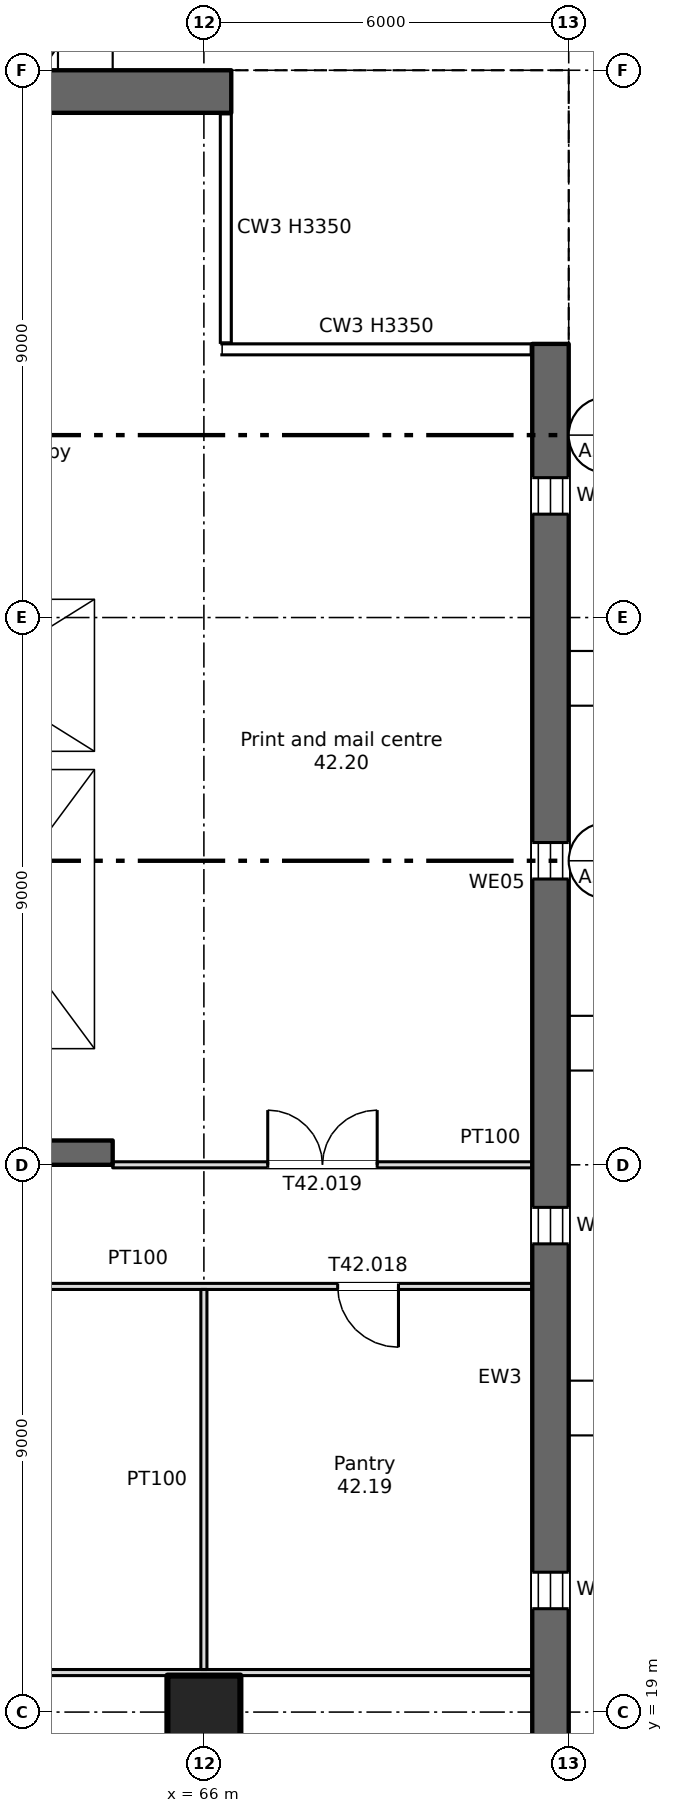
"""IFC4 building model, lengths in metres.
Left out: names, types, materials, properties, quantities, classifications, styles, units other than length and angle.
Written with IfcOpenShell. Run it as: python <this file> out.ifc"""

import sys

from ifc_helpers import new_model, si_unit, direction, frame, frame_2d, origin, origin_2d, place, context, subcontext, project, spatial, rectangle, extrude, element, fill, save


model = new_model("IFC4")
c1 = context("Model", 3, precision=1e-05, world=origin(), true_north=direction((0.0, 1.0)))
c2 = subcontext(c1, "Body", "Model", "MODEL_VIEW")
j1 = project(units=[si_unit("LENGTHUNIT", "METRE"), si_unit("PLANEANGLEUNIT", "RADIAN")], contexts=[c1])
p1 = place(None, origin())
s1 = spatial("IfcSite", under=j1, at=p1, CompositionType="ELEMENT")
p2 = place(p1, origin())
s2 = spatial("IfcBuilding", under=s1, at=p2, CompositionType="ELEMENT")
p3 = place(p2, frame((0.0, 0.0, 166.75)))
s3 = spatial("IfcBuildingStorey", under=s2, at=p3, CompositionType="ELEMENT", Elevation=166.75)
p4 = place(p3, frame((66.0, 19.0, 0.0), z_axis=(0.0, 0.0, 1.0), x_axis=(1.0, 0.0, 0.0)))
e1 = element("IfcColumn", 1, at=p4, inside=s3, PredefinedType="COLUMN", context=c2, shape_type="SweptSolid", body=[
    extrude(rectangle(XDim=1.2, YDim=1.2, at=origin_2d()), origin(), (0.0, 0.0, 1.0), 3.35),
])
p5 = place(p3, frame((71.7, 7.5, 0.0), z_axis=(0.0, 0.0, 1.0), x_axis=(0.0, 1.0, 0.0)))
e2 = element("IfcWall", 2, at=p5, inside=s3, PredefinedType="SHEAR", context=c2, shape_type="SweptSolid", body=[
    extrude(rectangle(XDim=34.0, YDim=0.6, at=frame_2d((17.0, 0.0))), origin(), (0.0, 0.0, 1.0), 3.35),
])
p6 = place(p5, frame((1.2, 0.0, 0.6)))
e3 = element("IfcOpeningElement", 3, at=p6, cuts=e2, PredefinedType="OPENING", context=c2, shape_type="SweptSolid", body=[
    extrude(rectangle(XDim=0.6, YDim=2.4, at=frame_2d((0.3, 1.2))), frame((0.0, 0.31, 0.0), z_axis=(0.0, -1.0, 0.0), x_axis=(1.0, 0.0, 0.0)), (0.0, 0.0, 1.0), 0.62),
])
p7 = place(p5, frame((7.2, 0.0, 0.6)))
e4 = element("IfcOpeningElement", 4, at=p7, cuts=e2, PredefinedType="OPENING", context=c2, shape_type="SweptSolid", body=[
    extrude(rectangle(XDim=0.6, YDim=2.4, at=frame_2d((0.3, 1.2))), frame((0.0, 0.31, 0.0), z_axis=(0.0, -1.0, 0.0), x_axis=(1.0, 0.0, 0.0)), (0.0, 0.0, 1.0), 0.62),
])
p8 = place(p5, frame((13.2, 0.0, 0.6)))
e5 = element("IfcOpeningElement", 5, at=p8, cuts=e2, PredefinedType="OPENING", context=c2, shape_type="SweptSolid", body=[
    extrude(rectangle(XDim=0.6, YDim=2.4, at=frame_2d((0.3, 1.2))), frame((0.0, 0.31, 0.0), z_axis=(0.0, -1.0, 0.0), x_axis=(1.0, 0.0, 0.0)), (0.0, 0.0, 1.0), 0.62),
])
p9 = place(p5, frame((19.2, 0.0, 0.6)))
e6 = element("IfcOpeningElement", 6, at=p9, cuts=e2, PredefinedType="OPENING", context=c2, shape_type="SweptSolid", body=[
    extrude(rectangle(XDim=0.6, YDim=2.4, at=frame_2d((0.3, 1.2))), frame((0.0, 0.31, 0.0), z_axis=(0.0, -1.0, 0.0), x_axis=(1.0, 0.0, 0.0)), (0.0, 0.0, 1.0), 0.62),
])
p10 = place(p5, frame((25.2, 0.0, 0.6)))
e7 = element("IfcOpeningElement", 7, at=p10, cuts=e2, PredefinedType="OPENING", context=c2, shape_type="SweptSolid", body=[
    extrude(rectangle(XDim=0.6, YDim=2.4, at=frame_2d((0.3, 1.2))), frame((0.0, 0.31, 0.0), z_axis=(0.0, -1.0, 0.0), x_axis=(1.0, 0.0, 0.0)), (0.0, 0.0, 1.0), 0.62),
])
p11 = place(p5, frame((31.2, 0.0, 0.6)))
e8 = element("IfcOpeningElement", 8, at=p11, cuts=e2, PredefinedType="OPENING", context=c2, shape_type="SweptSolid", body=[
    extrude(rectangle(XDim=0.6, YDim=2.4, at=frame_2d((0.3, 1.2))), frame((0.0, 0.31, 0.0), z_axis=(0.0, -1.0, 0.0), x_axis=(1.0, 0.0, 0.0)), (0.0, 0.0, 1.0), 0.62),
])
p12 = place(p3, frame((11.55, 45.65, 0.0), z_axis=(0.0, 0.0, 1.0), x_axis=(1.0, 0.0, 0.0)))
e9 = element("IfcWall", 9, at=p12, inside=s3, PredefinedType="SHEAR", context=c2, shape_type="SweptSolid", body=[
    extrude(rectangle(XDim=54.9, YDim=0.7, at=frame_2d((27.45, 0.0))), origin(), (0.0, 0.0, 1.0), 3.35),
])
p13 = place(p3, frame((6.6, 28.2, 0.0), z_axis=(0.0, 0.0, 1.0), x_axis=(1.0, 0.0, 0.0)))
e10 = element("IfcWall", 10, at=p13, inside=s3, PredefinedType="SHEAR", context=c2, shape_type="SweptSolid", body=[
    extrude(rectangle(XDim=57.9, YDim=0.4, at=frame_2d((28.95, 0.0))), origin(), (0.0, 0.0, 1.0), 3.35),
])
p14 = place(p13, frame((12.663, 0.0, 0.0)))
e11 = element("IfcOpeningElement", 11, at=p14, cuts=e10, PredefinedType="OPENING", context=c2, shape_type="SweptSolid", body=[
    extrude(rectangle(XDim=0.9, YDim=2.1, at=frame_2d((0.45, 1.05))), frame((0.0, 0.21, 0.0), z_axis=(0.0, -1.0, 0.0), x_axis=(1.0, 0.0, 0.0)), (0.0, 0.0, 1.0), 0.42),
])
p15 = place(p13, frame((15.238, 0.0, 0.0)))
e12 = element("IfcOpeningElement", 12, at=p15, cuts=e10, PredefinedType="OPENING", context=c2, shape_type="SweptSolid", body=[
    extrude(rectangle(XDim=0.9, YDim=2.1, at=frame_2d((0.45, 1.05))), frame((0.0, 0.21, 0.0), z_axis=(0.0, -1.0, 0.0), x_axis=(1.0, 0.0, 0.0)), (0.0, 0.0, 1.0), 0.42),
])
p16 = place(p13, frame((49.95, 0.0, 0.0)))
e13 = element("IfcOpeningElement", 13, at=p16, cuts=e10, PredefinedType="OPENING", context=c2, shape_type="SweptSolid", body=[
    extrude(rectangle(XDim=0.9, YDim=2.1, at=frame_2d((0.45, 1.05))), frame((0.0, 0.21, 0.0), z_axis=(0.0, -1.0, 0.0), x_axis=(1.0, 0.0, 0.0)), (0.0, 0.0, 1.0), 0.42),
])
p17 = place(p13, frame((0.663, 0.0, 0.0)))
e14 = element("IfcOpeningElement", 14, at=p17, cuts=e10, PredefinedType="OPENING", context=c2, shape_type="SweptSolid", body=[
    extrude(rectangle(XDim=0.9, YDim=2.1, at=frame_2d((0.45, 1.05))), frame((0.0, 0.21, 0.0), z_axis=(0.0, -1.0, 0.0), x_axis=(1.0, 0.0, 0.0)), (0.0, 0.0, 1.0), 0.42),
])
p18 = place(p13, frame((2.238, 0.0, 0.0)))
e15 = element("IfcOpeningElement", 15, at=p18, cuts=e10, PredefinedType="OPENING", context=c2, shape_type="SweptSolid", body=[
    extrude(rectangle(XDim=0.9, YDim=2.1, at=frame_2d((0.45, 1.05))), frame((0.0, 0.21, 0.0), z_axis=(0.0, -1.0, 0.0), x_axis=(1.0, 0.0, 0.0)), (0.0, 0.0, 1.0), 0.42),
])
p19 = place(p13, frame((4.8, 0.0, 0.0)))
e16 = element("IfcOpeningElement", 16, at=p19, cuts=e10, PredefinedType="OPENING", context=c2, shape_type="SweptSolid", body=[
    extrude(rectangle(XDim=1.2, YDim=2.1, at=frame_2d((0.6, 1.05))), frame((0.0, 0.21, 0.0), z_axis=(0.0, -1.0, 0.0), x_axis=(1.0, 0.0, 0.0)), (0.0, 0.0, 1.0), 0.42),
])
p20 = place(p13, frame((31.8, 0.0, 0.0)))
e17 = element("IfcOpeningElement", 17, at=p20, cuts=e10, PredefinedType="OPENING", context=c2, shape_type="SweptSolid", body=[
    extrude(rectangle(XDim=1.2, YDim=2.1, at=frame_2d((0.6, 1.05))), frame((0.0, 0.21, 0.0), z_axis=(0.0, -1.0, 0.0), x_axis=(1.0, 0.0, 0.0)), (0.0, 0.0, 1.0), 0.42),
])
p21 = place(p13, frame((55.3, 0.0, 0.0)))
e18 = element("IfcOpeningElement", 18, at=p21, cuts=e10, PredefinedType="OPENING", context=c2, shape_type="SweptSolid", body=[
    extrude(rectangle(XDim=1.2, YDim=2.1, at=frame_2d((0.6, 1.05))), frame((0.0, 0.21, 0.0), z_axis=(0.0, -1.0, 0.0), x_axis=(1.0, 0.0, 0.0)), (0.0, 0.0, 1.0), 0.42),
])
p22 = place(p13, frame((21.8, 0.0, 0.0)))
e19 = element("IfcOpeningElement", 19, at=p22, cuts=e10, PredefinedType="OPENING", context=c2, shape_type="SweptSolid", body=[
    extrude(rectangle(XDim=1.2, YDim=2.1, at=frame_2d((0.6, 1.05))), frame((0.0, 0.21, 0.0), z_axis=(0.0, -1.0, 0.0), x_axis=(1.0, 0.0, 0.0)), (0.0, 0.0, 1.0), 0.42),
])
p23 = place(p13, frame((41.8, 0.0, 0.0)))
e20 = element("IfcOpeningElement", 20, at=p23, cuts=e10, PredefinedType="OPENING", context=c2, shape_type="SweptSolid", body=[
    extrude(rectangle(XDim=1.2, YDim=2.1, at=frame_2d((0.6, 1.05))), frame((0.0, 0.21, 0.0), z_axis=(0.0, -1.0, 0.0), x_axis=(1.0, 0.0, 0.0)), (0.0, 0.0, 1.0), 0.42),
])
p24 = place(p13, frame((24.95, 0.0, 0.0)))
e21 = element("IfcOpeningElement", 21, at=p24, cuts=e10, PredefinedType="OPENING", context=c2, shape_type="SweptSolid", body=[
    extrude(rectangle(XDim=2.4, YDim=2.1, at=frame_2d((1.2, 1.05))), frame((0.0, 0.21, 0.0), z_axis=(0.0, -1.0, 0.0), x_axis=(1.0, 0.0, 0.0)), (0.0, 0.0, 1.0), 0.42),
])
p25 = place(p13, frame((37.45, 0.0, 0.0)))
e22 = element("IfcOpeningElement", 22, at=p25, cuts=e10, PredefinedType="OPENING", context=c2, shape_type="SweptSolid", body=[
    extrude(rectangle(XDim=2.4, YDim=2.1, at=frame_2d((1.2, 1.05))), frame((0.0, 0.21, 0.0), z_axis=(0.0, -1.0, 0.0), x_axis=(1.0, 0.0, 0.0)), (0.0, 0.0, 1.0), 0.42),
])
p26 = place(p13, frame((8.1, 0.0, 0.0)))
e23 = element("IfcOpeningElement", 23, at=p26, cuts=e10, PredefinedType="OPENING", context=c2, shape_type="SweptSolid", body=[
    extrude(rectangle(XDim=2.4, YDim=2.1, at=frame_2d((1.2, 1.05))), frame((0.0, 0.21, 0.0), z_axis=(0.0, -1.0, 0.0), x_axis=(1.0, 0.0, 0.0)), (0.0, 0.0, 1.0), 0.42),
])
p27 = place(p13, frame((28.95, 0.0, 0.0)))
e24 = element("IfcOpeningElement", 24, at=p27, cuts=e10, PredefinedType="OPENING", context=c2, shape_type="SweptSolid", body=[
    extrude(rectangle(XDim=0.9, YDim=2.1, at=frame_2d((0.45, 1.05))), frame((0.0, 0.21, 0.0), z_axis=(0.0, -1.0, 0.0), x_axis=(1.0, 0.0, 0.0)), (0.0, 0.0, 1.0), 0.42),
])
p28 = place(p13, frame((34.95, 0.0, 0.0)))
e25 = element("IfcOpeningElement", 25, at=p28, cuts=e10, PredefinedType="OPENING", context=c2, shape_type="SweptSolid", body=[
    extrude(rectangle(XDim=0.9, YDim=2.1, at=frame_2d((0.45, 1.05))), frame((0.0, 0.21, 0.0), z_axis=(0.0, -1.0, 0.0), x_axis=(1.0, 0.0, 0.0)), (0.0, 0.0, 1.0), 0.42),
])
p29 = place(p3, frame((64.35, 34.8, 0.0), z_axis=(0.0, 0.0, 1.0), x_axis=(0.0, 1.0, 0.0)))
e26 = element("IfcWall", 26, at=p29, inside=s3, PredefinedType="SHEAR", context=c2, shape_type="SweptSolid", body=[
    extrude(rectangle(XDim=10.5, YDim=0.3, at=frame_2d((5.25, 0.0))), origin(), (0.0, 0.0, 1.0), 3.35),
])
p30 = place(p3, frame((64.35, 28.4, 0.0), z_axis=(0.0, 0.0, 1.0), x_axis=(0.0, 1.0, 0.0)))
e27 = element("IfcWall", 27, at=p30, inside=s3, PredefinedType="SHEAR", context=c2, shape_type="SweptSolid", body=[
    extrude(rectangle(XDim=6.1, YDim=0.3, at=frame_2d((3.05, 0.0))), origin(), (0.0, 0.0, 1.0), 3.35),
])
p31 = place(p3, frame((60.2, 34.65, 0.0), z_axis=(0.0, 0.0, 1.0), x_axis=(1.0, 0.0, 0.0)))
e28 = element("IfcWall", 28, at=p31, inside=s3, PredefinedType="SHEAR", context=c2, shape_type="SweptSolid", body=[
    extrude(rectangle(XDim=4.3, YDim=0.3, at=frame_2d((2.15, 0.0))), origin(), (0.0, 0.0, 1.0), 3.35),
])
p32 = place(p3, frame((60.2, 37.45, 0.0), z_axis=(0.0, 0.0, 1.0), x_axis=(1.0, 0.0, 0.0)))
e29 = element("IfcWall", 29, at=p32, inside=s3, PredefinedType="SHEAR", context=c2, shape_type="SweptSolid", body=[
    extrude(rectangle(XDim=4.0, YDim=0.3, at=frame_2d((2.0, 0.0))), origin(), (0.0, 0.0, 1.0), 3.35),
])
p33 = place(p32, frame((1.45, 0.0, 0.0)))
e30 = element("IfcOpeningElement", 30, at=p33, cuts=e29, PredefinedType="OPENING", context=c2, shape_type="SweptSolid", body=[
    extrude(rectangle(XDim=1.1, YDim=2.1, at=frame_2d((0.55, 1.05))), frame((0.0, 0.16, 0.0), z_axis=(0.0, -1.0, 0.0), x_axis=(1.0, 0.0, 0.0)), (0.0, 0.0, 1.0), 0.32),
])
p34 = place(p3, frame((52.05, 19.65, 0.0), z_axis=(0.0, 0.0, 1.0), x_axis=(1.0, 0.0, 0.0)))
e31 = element("IfcWall", 31, at=p34, inside=s3, PredefinedType="PARTITIONING", context=c2, shape_type="SweptSolid", body=[
    extrude(rectangle(XDim=19.35, YDim=0.1, at=frame_2d((9.675, 0.0))), origin(), (0.0, 0.0, 1.0), 3.35),
])
p35 = place(p3, frame((51.95, 26.0, 0.0), z_axis=(0.0, 0.0, 1.0), x_axis=(1.0, 0.0, 0.0)))
e32 = element("IfcWall", 32, at=p35, inside=s3, PredefinedType="PARTITIONING", context=c2, shape_type="SweptSolid", body=[
    extrude(rectangle(XDim=19.45, YDim=0.1, at=frame_2d((9.725, 0.0))), origin(), (0.0, 0.0, 1.0), 3.35),
])
p36 = place(p35, frame((9.05, 0.0, 0.0)))
e33 = element("IfcOpeningElement", 33, at=p36, cuts=e32, PredefinedType="OPENING", context=c2, shape_type="SweptSolid", body=[
    extrude(rectangle(XDim=1.0, YDim=2.1, at=frame_2d((0.5, 1.05))), frame((0.0, 0.06, 0.0), z_axis=(0.0, -1.0, 0.0), x_axis=(1.0, 0.0, 0.0)), (0.0, 0.0, 1.0), 0.12),
])
p37 = place(p35, frame((16.25, 0.0, 0.0)))
e34 = element("IfcOpeningElement", 34, at=p37, cuts=e32, PredefinedType="OPENING", context=c2, shape_type="SweptSolid", body=[
    extrude(rectangle(XDim=1.0, YDim=2.1, at=frame_2d((0.5, 1.05))), frame((0.0, 0.06, 0.0), z_axis=(0.0, -1.0, 0.0), x_axis=(1.0, 0.0, 0.0)), (0.0, 0.0, 1.0), 0.12),
])
p38 = place(p3, frame((64.5, 28.0, 0.0), z_axis=(0.0, 0.0, 1.0), x_axis=(1.0, 0.0, 0.0)))
e35 = element("IfcWall", 35, at=p38, inside=s3, PredefinedType="PARTITIONING", context=c2, shape_type="SweptSolid", body=[
    extrude(rectangle(XDim=6.9, YDim=0.1, at=frame_2d((3.45, 0.0))), origin(), (0.0, 0.0, 1.0), 3.35),
])
p39 = place(p38, frame((2.55, 0.0, 0.0)))
e36 = element("IfcOpeningElement", 36, at=p39, cuts=e35, PredefinedType="OPENING", context=c2, shape_type="SweptSolid", body=[
    extrude(rectangle(XDim=1.8, YDim=2.1, at=frame_2d((0.9, 1.05))), frame((0.0, 0.06, 0.0), z_axis=(0.0, -1.0, 0.0), x_axis=(1.0, 0.0, 0.0)), (0.0, 0.0, 1.0), 0.12),
])
p40 = place(p3, frame((66.0, 19.7, 0.0), z_axis=(0.0, 0.0, 1.0), x_axis=(0.0, 1.0, 0.0)))
e37 = element("IfcWall", 37, at=p40, inside=s3, PredefinedType="PARTITIONING", context=c2, shape_type="SweptSolid", body=[
    extrude(rectangle(XDim=6.25, YDim=0.1, at=frame_2d((3.125, 0.0))), origin(), (0.0, 0.0, 1.0), 3.35),
])
p41 = place(p8, origin())
e38 = element("IfcWindow", 38, at=p41, inside=s3, PartitioningType="SINGLE_PANEL", PredefinedType="WINDOW", context=c2, shape_type="SweptSolid", body=[
    extrude(rectangle(XDim=0.6, YDim=2.4, at=frame_2d((0.3, 1.2))), frame((0.0, 0.03, 0.0), z_axis=(0.0, -1.0, 0.0), x_axis=(1.0, 0.0, 0.0)), (0.0, 0.0, 1.0), 0.06),
])
fill(e5, e38)
p42 = place(p9, origin())
e39 = element("IfcWindow", 39, at=p42, inside=s3, PartitioningType="SINGLE_PANEL", PredefinedType="WINDOW", context=c2, shape_type="SweptSolid", body=[
    extrude(rectangle(XDim=0.6, YDim=2.4, at=frame_2d((0.3, 1.2))), frame((0.0, 0.03, 0.0), z_axis=(0.0, -1.0, 0.0), x_axis=(1.0, 0.0, 0.0)), (0.0, 0.0, 1.0), 0.06),
])
fill(e6, e39)
p43 = place(p10, origin())
e40 = element("IfcWindow", 40, at=p43, inside=s3, PartitioningType="SINGLE_PANEL", PredefinedType="WINDOW", context=c2, shape_type="SweptSolid", body=[
    extrude(rectangle(XDim=0.6, YDim=2.4, at=frame_2d((0.3, 1.2))), frame((0.0, 0.03, 0.0), z_axis=(0.0, -1.0, 0.0), x_axis=(1.0, 0.0, 0.0)), (0.0, 0.0, 1.0), 0.06),
])
fill(e7, e40)
p44 = place(p11, origin())
e41 = element("IfcWindow", 41, at=p44, inside=s3, PartitioningType="SINGLE_PANEL", PredefinedType="WINDOW", context=c2, shape_type="SweptSolid", body=[
    extrude(rectangle(XDim=0.6, YDim=2.4, at=frame_2d((0.3, 1.2))), frame((0.0, 0.03, 0.0), z_axis=(0.0, -1.0, 0.0), x_axis=(1.0, 0.0, 0.0)), (0.0, 0.0, 1.0), 0.06),
])
fill(e8, e41)
p45 = place(p37, origin())
e42 = element("IfcDoor", 42, at=p45, inside=s3, OperationType="SINGLE_SWING_RIGHT", PredefinedType="DOOR", context=c2, shape_type="SweptSolid", body=[
    extrude(rectangle(XDim=1.0, YDim=2.1, at=frame_2d((0.5, 1.05))), frame((0.0, 0.025, 0.0), z_axis=(0.0, -1.0, 0.0), x_axis=(1.0, 0.0, 0.0)), (0.0, 0.0, 1.0), 0.05),
])
fill(e34, e42)
p46 = place(p39, origin())
e43 = element("IfcDoor", 43, at=p46, inside=s3, OperationType="DOUBLE_DOOR_SINGLE_SWING", PredefinedType="DOOR", context=c2, shape_type="SweptSolid", body=[
    extrude(rectangle(XDim=1.8, YDim=2.1, at=frame_2d((0.9, 1.05))), frame((0.0, 0.025, 0.0), z_axis=(0.0, -1.0, 0.0), x_axis=(1.0, 0.0, 0.0)), (0.0, 0.0, 1.0), 0.05),
])
fill(e36, e43)
save(model, sys.argv[1])
